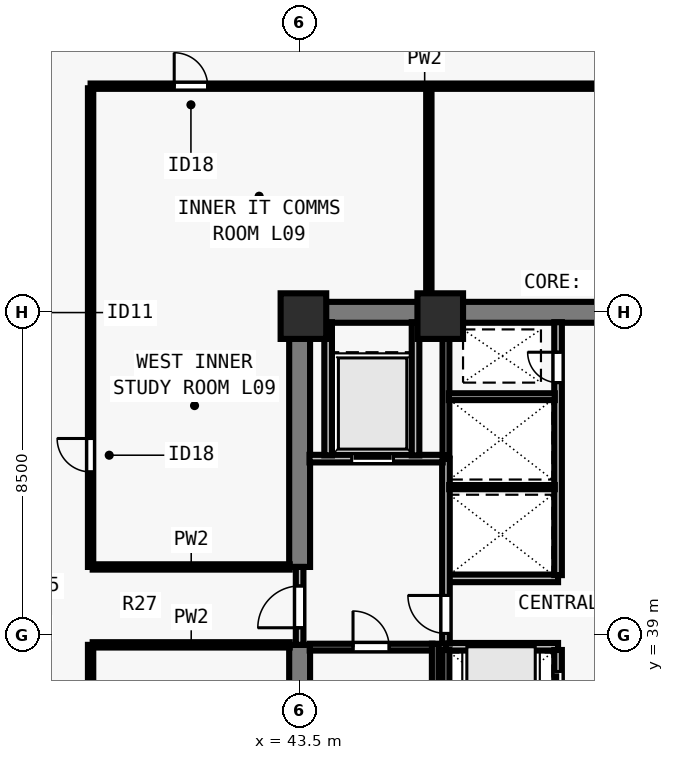
"""IFC4 building model, lengths in metres.
Left out: names, types, materials, properties, quantities, classifications, styles, units other than length and angle.
Written with IfcOpenShell. Run it as: python <this file> out.ifc"""

import sys

from ifc_helpers import new_model, si_unit, direction, frame, frame_2d, origin, origin_2d, place, context, subcontext, project, spatial, rectangle, extrude, element, fill, save


model = new_model("IFC4")
c1 = context("Model", 3, precision=1e-05, world=origin(), true_north=direction((0.0, 1.0)))
c2 = subcontext(c1, "Body", "Model", "MODEL_VIEW")
j1 = project(units=[si_unit("LENGTHUNIT", "METRE"), si_unit("PLANEANGLEUNIT", "RADIAN")], contexts=[c1])
p1 = place(None, origin())
s1 = spatial("IfcSite", under=j1, at=p1, CompositionType="ELEMENT")
p2 = place(p1, origin())
s2 = spatial("IfcBuilding", under=s1, at=p2, CompositionType="ELEMENT")
p3 = place(p2, frame((0.0, 0.0, 37.5)))
s3 = spatial("IfcBuildingStorey", under=s2, at=p3, CompositionType="ELEMENT", Elevation=37.5)
for number, where, z_axis, x_axis in (
    (1, (43.6, 47.4, 0.0), (0.0, 0.0, 1.0), (1.0, 0.0, 0.0)),
    (2, (47.2, 47.4, 0.0), (0.0, 0.0, 1.0), (1.0, 0.0, 0.0)),
):
    element("IfcColumn", number, at=place(p3, frame(where, z_axis=z_axis, x_axis=x_axis)), inside=s3, PredefinedType="COLUMN", context=c2, shape_type="SweptSolid", body=[
        extrude(rectangle(XDim=1.2, YDim=1.2, at=origin_2d()), origin(), (0.0, 0.0, 1.0), 3.5),
    ])
p4 = place(p3, frame((43.225, 47.5, 0.0), z_axis=(0.0, 0.0, 1.0), x_axis=(1.0, 0.0, 0.0)))
e3 = element("IfcWall", 3, at=p4, inside=s3, PredefinedType="SHEAR", context=c2, shape_type="SweptSolid", body=[
    extrude(rectangle(XDim=17.55, YDim=0.55, at=frame_2d((8.775, 0.0))), origin(), (0.0, 0.0, 1.0), 3.28),
])
p5 = place(p3, frame((43.5, 30.765, 0.0), z_axis=(0.0, 0.0, 1.0), x_axis=(0.0, 1.0, 0.0)))
e4 = element("IfcWall", 4, at=p5, inside=s3, PredefinedType="SHEAR", context=c2, shape_type="SweptSolid", body=[
    extrude(rectangle(XDim=7.985, YDim=0.55, at=frame_2d((3.993, 0.0))), origin(), (0.0, 0.0, 1.0), 3.28),
])
p6 = place(p3, frame((43.5, 40.8, 0.0), z_axis=(0.0, 0.0, 1.0), x_axis=(0.0, 1.0, 0.0)))
e5 = element("IfcWall", 5, at=p6, inside=s3, PredefinedType="SHEAR", context=c2, shape_type="SweptSolid", body=[
    extrude(rectangle(XDim=6.435, YDim=0.55, at=frame_2d((3.218, 0.0))), origin(), (0.0, 0.0, 1.0), 3.28),
])
for number, where, z_axis, x_axis in (
    (6, (47.35, 38.7, 0.0), (0.0, 0.0, 1.0), (1.0, 0.0, 0.0)),
    (7, (47.35, 40.5, 0.0), (0.0, 0.0, 1.0), (1.0, 0.0, 0.0)),
):
    element("IfcWall", number, at=place(p3, frame(where, z_axis=z_axis, x_axis=x_axis)), inside=s3, PredefinedType="SOLIDWALL", context=c2, shape_type="SweptSolid", body=[
        extrude(rectangle(XDim=2.95, YDim=0.2, at=frame_2d((1.475, 0.0))), origin(), (0.0, 0.0, 1.0), 3.28),
    ])
p7 = place(p3, frame((50.3, 30.76, 0.0), z_axis=(0.0, 0.0, 1.0), x_axis=(0.0, 1.0, 0.0)))
e8 = element("IfcWall", 8, at=p7, inside=s3, PredefinedType="SOLIDWALL", context=c2, shape_type="SweptSolid", body=[
    extrude(rectangle(XDim=7.855, YDim=0.2, at=frame_2d((3.927, 0.0))), origin(), (0.0, 0.0, 1.0), 3.28),
])
p8 = place(p7, frame((0.79, 0.0, 0.0)))
e9 = element("IfcOpeningElement", 9, at=p8, cuts=e8, PredefinedType="OPENING", context=c2, shape_type="SweptSolid", body=[
    extrude(rectangle(XDim=1.1, YDim=2.2, at=frame_2d((0.55, 1.1))), frame((0.0, 0.11, 0.0), z_axis=(0.0, -1.0, 0.0), x_axis=(1.0, 0.0, 0.0)), (0.0, 0.0, 1.0), 0.22),
])
p9 = place(p7, frame((3.49, 0.0, 0.0)))
e10 = element("IfcOpeningElement", 10, at=p9, cuts=e8, PredefinedType="OPENING", context=c2, shape_type="SweptSolid", body=[
    extrude(rectangle(XDim=1.1, YDim=2.2, at=frame_2d((0.55, 1.1))), frame((0.0, 0.11, 0.0), z_axis=(0.0, -1.0, 0.0), x_axis=(1.0, 0.0, 0.0)), (0.0, 0.0, 1.0), 0.22),
])
p10 = place(p7, frame((6.19, 0.0, 0.0)))
e11 = element("IfcOpeningElement", 11, at=p10, cuts=e8, PredefinedType="OPENING", context=c2, shape_type="SweptSolid", body=[
    extrude(rectangle(XDim=1.1, YDim=2.2, at=frame_2d((0.55, 1.1))), frame((0.0, 0.11, 0.0), z_axis=(0.0, -1.0, 0.0), x_axis=(1.0, 0.0, 0.0)), (0.0, 0.0, 1.0), 0.22),
])
p11 = place(p3, frame((50.3, 40.585, 0.0), z_axis=(0.0, 0.0, 1.0), x_axis=(0.0, 1.0, 0.0)))
e12 = element("IfcWall", 12, at=p11, inside=s3, PredefinedType="SOLIDWALL", context=c2, shape_type="SweptSolid", body=[
    extrude(rectangle(XDim=6.655, YDim=0.2, at=frame_2d((3.328, 0.0))), origin(), (0.0, 0.0, 1.0), 3.28),
])
p12 = place(p11, frame((5.065, 0.0, 0.0)))
e13 = element("IfcOpeningElement", 13, at=p12, cuts=e12, PredefinedType="OPENING", context=c2, shape_type="SweptSolid", body=[
    extrude(rectangle(XDim=0.8, YDim=2.08, at=frame_2d((0.4, 1.04))), frame((0.0, 0.11, 0.0), z_axis=(0.0, -1.0, 0.0), x_axis=(1.0, 0.0, 0.0)), (0.0, 0.0, 1.0), 0.22),
])
p13 = place(p3, frame((43.5, 38.75, 0.0), z_axis=(0.0, 0.0, 1.0), x_axis=(0.0, 1.0, 0.0)))
e14 = element("IfcWall", 14, at=p13, inside=s3, PredefinedType="SOLIDWALL", context=c2, shape_type="SweptSolid", body=[
    extrude(rectangle(XDim=2.05, YDim=0.2, at=frame_2d((1.025, 0.0))), origin(), (0.0, 0.0, 1.0), 3.28),
])
p14 = place(p13, frame((0.45, 0.0, 0.0)))
e15 = element("IfcOpeningElement", 15, at=p14, cuts=e14, PredefinedType="OPENING", context=c2, shape_type="SweptSolid", body=[
    extrude(rectangle(XDim=1.1, YDim=2.15, at=frame_2d((0.55, 1.075))), frame((0.0, 0.11, 0.0), z_axis=(0.0, -1.0, 0.0), x_axis=(1.0, 0.0, 0.0)), (0.0, 0.0, 1.0), 0.22),
])
p15 = place(p3, frame((47.35, 38.785, 0.0), z_axis=(0.0, 0.0, 1.0), x_axis=(0.0, 1.0, 0.0)))
e16 = element("IfcWall", 16, at=p15, inside=s3, PredefinedType="SOLIDWALL", context=c2, shape_type="SweptSolid", body=[
    extrude(rectangle(XDim=4.865, YDim=0.2, at=frame_2d((2.433, 0.0))), origin(), (0.0, 0.0, 1.0), 3.28),
])
p16 = place(p15, frame((0.265, 0.0, 0.0)))
e17 = element("IfcOpeningElement", 17, at=p16, cuts=e16, PredefinedType="OPENING", context=c2, shape_type="SweptSolid", body=[
    extrude(rectangle(XDim=1.0, YDim=2.15, at=frame_2d((0.5, 1.075))), frame((0.0, 0.11, 0.0), z_axis=(0.0, -1.0, 0.0), x_axis=(1.0, 0.0, 0.0)), (0.0, 0.0, 1.0), 0.22),
])
p17 = place(p3, frame((43.76, 43.65, 0.0), z_axis=(0.0, 0.0, 1.0), x_axis=(1.0, 0.0, 0.0)))
e18 = element("IfcWall", 18, at=p17, inside=s3, PredefinedType="SOLIDWALL", context=c2, shape_type="SweptSolid", body=[
    extrude(rectangle(XDim=3.505, YDim=0.2, at=frame_2d((1.752, 0.0))), origin(), (0.0, 0.0, 1.0), 3.28),
])
p18 = place(p17, frame((1.11, 0.0, 0.0)))
e19 = element("IfcOpeningElement", 19, at=p18, cuts=e18, PredefinedType="OPENING", context=c2, shape_type="SweptSolid", body=[
    extrude(rectangle(XDim=1.1, YDim=2.2, at=frame_2d((0.55, 1.1))), frame((0.0, 0.11, 0.0), z_axis=(0.0, -1.0, 0.0), x_axis=(1.0, 0.0, 0.0)), (0.0, 0.0, 1.0), 0.22),
])
for number, where, z_axis, x_axis in (
    (20, (46.55, 43.735, 0.0), (0.0, 0.0, 1.0), (0.0, 1.0, 0.0)),
    (21, (44.25, 43.735, 0.0), (0.0, 0.0, 1.0), (0.0, 1.0, 0.0)),
):
    element("IfcWall", number, at=place(p3, frame(where, z_axis=z_axis, x_axis=x_axis)), inside=s3, PredefinedType="SOLIDWALL", context=c2, shape_type="SweptSolid", body=[
        extrude(rectangle(XDim=3.505, YDim=0.2, at=frame_2d((1.752, 0.0))), origin(), (0.0, 0.0, 1.0), 3.28),
    ])
p19 = place(p3, frame((47.35, 30.76, 0.0), z_axis=(0.0, 0.0, 1.0), x_axis=(0.0, 1.0, 0.0)))
e22 = element("IfcWall", 22, at=p19, inside=s3, PredefinedType="SOLIDWALL", context=c2, shape_type="SweptSolid", body=[
    extrude(rectangle(XDim=7.855, YDim=0.18, at=frame_2d((3.927, 0.0))), origin(), (0.0, 0.0, 1.0), 3.28),
])
p20 = place(p3, frame((47.35, 43.735, 0.0), z_axis=(0.0, 0.0, 1.0), x_axis=(0.0, 1.0, 0.0)))
e23 = element("IfcWall", 23, at=p20, inside=s3, PredefinedType="SOLIDWALL", context=c2, shape_type="SweptSolid", body=[
    extrude(rectangle(XDim=3.505, YDim=0.18, at=frame_2d((1.752, 0.0))), origin(), (0.0, 0.0, 1.0), 3.28),
])
p21 = place(p3, frame((47.435, 42.9, 0.0), z_axis=(0.0, 0.0, 1.0), x_axis=(1.0, 0.0, 0.0)))
e24 = element("IfcWall", 24, at=p21, inside=s3, PredefinedType="PARTITIONING", context=c2, shape_type="SweptSolid", body=[
    extrude(rectangle(XDim=2.78, YDim=0.11, at=frame_2d((1.39, 0.0))), origin(), (0.0, 0.0, 1.0), 3.28),
])
p22 = place(p3, frame((47.425, 45.28, 0.0), z_axis=(0.0, 0.0, 1.0), x_axis=(1.0, 0.0, 0.0)))
e25 = element("IfcWall", 25, at=p22, inside=s3, PredefinedType="SOLIDWALL", context=c2, shape_type="SweptSolid", body=[
    extrude(rectangle(XDim=2.79, YDim=0.18, at=frame_2d((1.395, 0.0))), origin(), (0.0, 0.0, 1.0), 3.28),
])
p23 = place(p3, frame((38.0, 53.45, 0.0), z_axis=(0.0, 0.0, 1.0), x_axis=(1.0, 0.0, 0.0)))
e26 = element("IfcWall", 26, at=p23, inside=s3, PredefinedType="PARTITIONING", context=c2, shape_type="SweptSolid", body=[
    extrude(rectangle(XDim=28.0, YDim=0.14, at=frame_2d((14.0, 0.0))), origin(), (0.0, 0.0, 1.0), 3.28),
])
p24 = place(p23, frame((2.2, 0.0, 0.0)))
e27 = element("IfcOpeningElement", 27, at=p24, cuts=e26, PredefinedType="OPENING", context=c2, shape_type="SweptSolid", body=[
    extrude(rectangle(XDim=0.88, YDim=2.1, at=frame_2d((0.44, 1.05))), frame((0.0, 0.08, 0.0), z_axis=(0.0, -1.0, 0.0), x_axis=(1.0, 0.0, 0.0)), (0.0, 0.0, 1.0), 0.16),
])
p25 = place(p23, frame((14.5, 0.0, 0.0)))
e28 = element("IfcOpeningElement", 28, at=p25, cuts=e26, PredefinedType="OPENING", context=c2, shape_type="SweptSolid", body=[
    extrude(rectangle(XDim=0.88, YDim=2.1, at=frame_2d((0.44, 1.05))), frame((0.0, 0.08, 0.0), z_axis=(0.0, -1.0, 0.0), x_axis=(1.0, 0.0, 0.0)), (0.0, 0.0, 1.0), 0.16),
])
p26 = place(p23, frame((24.0, 0.0, 0.0)))
e29 = element("IfcOpeningElement", 29, at=p26, cuts=e26, PredefinedType="OPENING", context=c2, shape_type="SweptSolid", body=[
    extrude(rectangle(XDim=0.88, YDim=2.1, at=frame_2d((0.44, 1.05))), frame((0.0, 0.08, 0.0), z_axis=(0.0, -1.0, 0.0), x_axis=(1.0, 0.0, 0.0)), (0.0, 0.0, 1.0), 0.16),
])
p27 = place(p3, frame((38.0, 24.605, 0.0), z_axis=(0.0, 0.0, 1.0), x_axis=(0.0, 1.0, 0.0)))
e30 = element("IfcWall", 30, at=p27, inside=s3, PredefinedType="PARTITIONING", context=c2, shape_type="SweptSolid", body=[
    extrude(rectangle(XDim=14.145, YDim=0.14, at=frame_2d((7.073, 0.0))), origin(), (0.0, 0.0, 1.0), 3.28),
])
p28 = place(p27, frame((1.045, 0.0, 0.0)))
e31 = element("IfcOpeningElement", 31, at=p28, cuts=e30, PredefinedType="OPENING", context=c2, shape_type="SweptSolid", body=[
    extrude(rectangle(XDim=0.88, YDim=2.1, at=frame_2d((0.44, 1.05))), frame((0.0, 0.08, 0.0), z_axis=(0.0, -1.0, 0.0), x_axis=(1.0, 0.0, 0.0)), (0.0, 0.0, 1.0), 0.16),
])
p29 = place(p27, frame((11.195, 0.0, 0.0)))
e32 = element("IfcOpeningElement", 32, at=p29, cuts=e30, PredefinedType="OPENING", context=c2, shape_type="SweptSolid", body=[
    extrude(rectangle(XDim=0.88, YDim=2.1, at=frame_2d((0.44, 1.05))), frame((0.0, 0.08, 0.0), z_axis=(0.0, -1.0, 0.0), x_axis=(1.0, 0.0, 0.0)), (0.0, 0.0, 1.0), 0.16),
])
p30 = place(p3, frame((38.0, 40.8, 0.0), z_axis=(0.0, 0.0, 1.0), x_axis=(0.0, 1.0, 0.0)))
e33 = element("IfcWall", 33, at=p30, inside=s3, PredefinedType="PARTITIONING", context=c2, shape_type="SweptSolid", body=[
    extrude(rectangle(XDim=12.595, YDim=0.14, at=frame_2d((6.297, 0.0))), origin(), (0.0, 0.0, 1.0), 3.28),
])
p31 = place(p30, frame((2.5, 0.0, 0.0)))
e34 = element("IfcOpeningElement", 34, at=p31, cuts=e33, PredefinedType="OPENING", context=c2, shape_type="SweptSolid", body=[
    extrude(rectangle(XDim=0.88, YDim=2.1, at=frame_2d((0.44, 1.05))), frame((0.0, 0.08, 0.0), z_axis=(0.0, -1.0, 0.0), x_axis=(1.0, 0.0, 0.0)), (0.0, 0.0, 1.0), 0.16),
])
for number, where, z_axis, x_axis in (
    (35, (38.055, 38.75, 0.0), (0.0, 0.0, 1.0), (1.0, 0.0, 0.0)),
    (36, (38.055, 40.8, 0.0), (0.0, 0.0, 1.0), (1.0, 0.0, 0.0)),
):
    element("IfcWall", number, at=place(p3, frame(where, z_axis=z_axis, x_axis=x_axis)), inside=s3, PredefinedType="PARTITIONING", context=c2, shape_type="SweptSolid", body=[
        extrude(rectangle(XDim=5.185, YDim=0.14, at=frame_2d((2.593, 0.0))), origin(), (0.0, 0.0, 1.0), 3.28),
    ])
p32 = place(p3, frame((46.9, 47.76, 0.0), z_axis=(0.0, 0.0, 1.0), x_axis=(0.0, 1.0, 0.0)))
e37 = element("IfcWall", 37, at=p32, inside=s3, PredefinedType="PARTITIONING", context=c2, shape_type="SweptSolid", body=[
    extrude(rectangle(XDim=5.635, YDim=0.14, at=frame_2d((2.817, 0.0))), origin(), (0.0, 0.0, 1.0), 3.28),
])
p33 = place(p3, frame((43.765, 38.69, 0.0), z_axis=(0.0, 0.0, 1.0), x_axis=(1.0, 0.0, 0.0)))
e38 = element("IfcWall", 38, at=p33, inside=s3, PredefinedType="SOLIDWALL", context=c2, shape_type="SweptSolid", body=[
    extrude(rectangle(XDim=3.23, YDim=0.18, at=frame_2d((1.615, 0.0))), origin(), (0.0, 0.0, 1.0), 3.28),
])
p34 = place(p33, frame((1.14, 0.0, 0.0)))
e39 = element("IfcOpeningElement", 39, at=p34, cuts=e38, PredefinedType="OPENING", context=c2, shape_type="SweptSolid", body=[
    extrude(rectangle(XDim=0.95, YDim=2.15, at=frame_2d((0.475, 1.075))), frame((0.0, 0.1, 0.0), z_axis=(0.0, -1.0, 0.0), x_axis=(1.0, 0.0, 0.0)), (0.0, 0.0, 1.0), 0.2),
])
p35 = place(p3, frame((47.07, 38.78, 0.0), z_axis=(0.0, 0.0, 1.0), x_axis=(0.0, -1.0, 0.0)))
e40 = element("IfcWall", 40, at=p35, inside=s3, PredefinedType="SOLIDWALL", context=c2, shape_type="SweptSolid", body=[
    extrude(rectangle(XDim=8.017, YDim=0.18, at=frame_2d((4.009, 0.0))), origin(), (0.0, 0.0, 1.0), 3.28),
])
p36 = place(p14, origin())
e41 = element("IfcDoor", 41, at=p36, inside=s3, OperationType="SINGLE_SWING_LEFT", PredefinedType="DOOR", context=c2, shape_type="SweptSolid", body=[
    extrude(rectangle(XDim=1.1, YDim=2.15, at=frame_2d((0.55, 1.075))), frame((0.0, 0.025, 0.0), z_axis=(0.0, -1.0, 0.0), x_axis=(1.0, 0.0, 0.0)), (0.0, 0.0, 1.0), 0.05),
])
fill(e15, e41)
p37 = place(p16, origin())
e42 = element("IfcDoor", 42, at=p37, inside=s3, OperationType="SINGLE_SWING_RIGHT", PredefinedType="DOOR", context=c2, shape_type="SweptSolid", body=[
    extrude(rectangle(XDim=1.0, YDim=2.15, at=frame_2d((0.5, 1.075))), frame((0.0, 0.025, 0.0), z_axis=(0.0, -1.0, 0.0), x_axis=(1.0, 0.0, 0.0)), (0.0, 0.0, 1.0), 0.05),
])
fill(e17, e42)
p38 = place(p18, origin())
e43 = element("IfcDoor", 43, at=p38, inside=s3, OperationType="SLIDING_TO_LEFT", PredefinedType="DOOR", context=c2, shape_type="SweptSolid", body=[
    extrude(rectangle(XDim=1.1, YDim=2.2, at=frame_2d((0.55, 1.1))), frame((0.0, 0.025, 0.0), z_axis=(0.0, -1.0, 0.0), x_axis=(1.0, 0.0, 0.0)), (0.0, 0.0, 1.0), 0.05),
])
fill(e19, e43)
p39 = place(p10, origin())
e44 = element("IfcDoor", 44, at=p39, inside=s3, OperationType="SLIDING_TO_LEFT", PredefinedType="DOOR", context=c2, shape_type="SweptSolid", body=[
    extrude(rectangle(XDim=1.1, YDim=2.2, at=frame_2d((0.55, 1.1))), frame((0.0, 0.025, 0.0), z_axis=(0.0, -1.0, 0.0), x_axis=(1.0, 0.0, 0.0)), (0.0, 0.0, 1.0), 0.05),
])
fill(e11, e44)
p40 = place(p12, origin())
e45 = element("IfcDoor", 45, at=p40, inside=s3, OperationType="SINGLE_SWING_RIGHT", PredefinedType="DOOR", context=c2, shape_type="SweptSolid", body=[
    extrude(rectangle(XDim=0.8, YDim=2.08, at=frame_2d((0.4, 1.04))), frame((0.0, 0.025, 0.0), z_axis=(0.0, -1.0, 0.0), x_axis=(1.0, 0.0, 0.0)), (0.0, 0.0, 1.0), 0.05),
])
fill(e13, e45)
p41 = place(p24, origin())
e46 = element("IfcDoor", 46, at=p41, inside=s3, OperationType="SINGLE_SWING_LEFT", PredefinedType="DOOR", context=c2, shape_type="SweptSolid", body=[
    extrude(rectangle(XDim=0.88, YDim=2.1, at=frame_2d((0.44, 1.05))), frame((0.0, 0.025, 0.0), z_axis=(0.0, -1.0, 0.0), x_axis=(1.0, 0.0, 0.0)), (0.0, 0.0, 1.0), 0.05),
])
fill(e27, e46)
p42 = place(p31, origin())
e47 = element("IfcDoor", 47, at=p42, inside=s3, OperationType="SINGLE_SWING_RIGHT", PredefinedType="DOOR", context=c2, shape_type="SweptSolid", body=[
    extrude(rectangle(XDim=0.88, YDim=2.1, at=frame_2d((0.44, 1.05))), frame((0.0, 0.025, 0.0), z_axis=(0.0, -1.0, 0.0), x_axis=(1.0, 0.0, 0.0)), (0.0, 0.0, 1.0), 0.05),
])
fill(e34, e47)
p43 = place(p34, origin())
e48 = element("IfcDoor", 48, at=p43, inside=s3, OperationType="SINGLE_SWING_LEFT", PredefinedType="DOOR", context=c2, shape_type="SweptSolid", body=[
    extrude(rectangle(XDim=0.95, YDim=2.15, at=frame_2d((0.475, 1.075))), frame((0.0, 0.025, 0.0), z_axis=(0.0, -1.0, 0.0), x_axis=(1.0, 0.0, 0.0)), (0.0, 0.0, 1.0), 0.05),
])
fill(e39, e48)
save(model, sys.argv[1])
